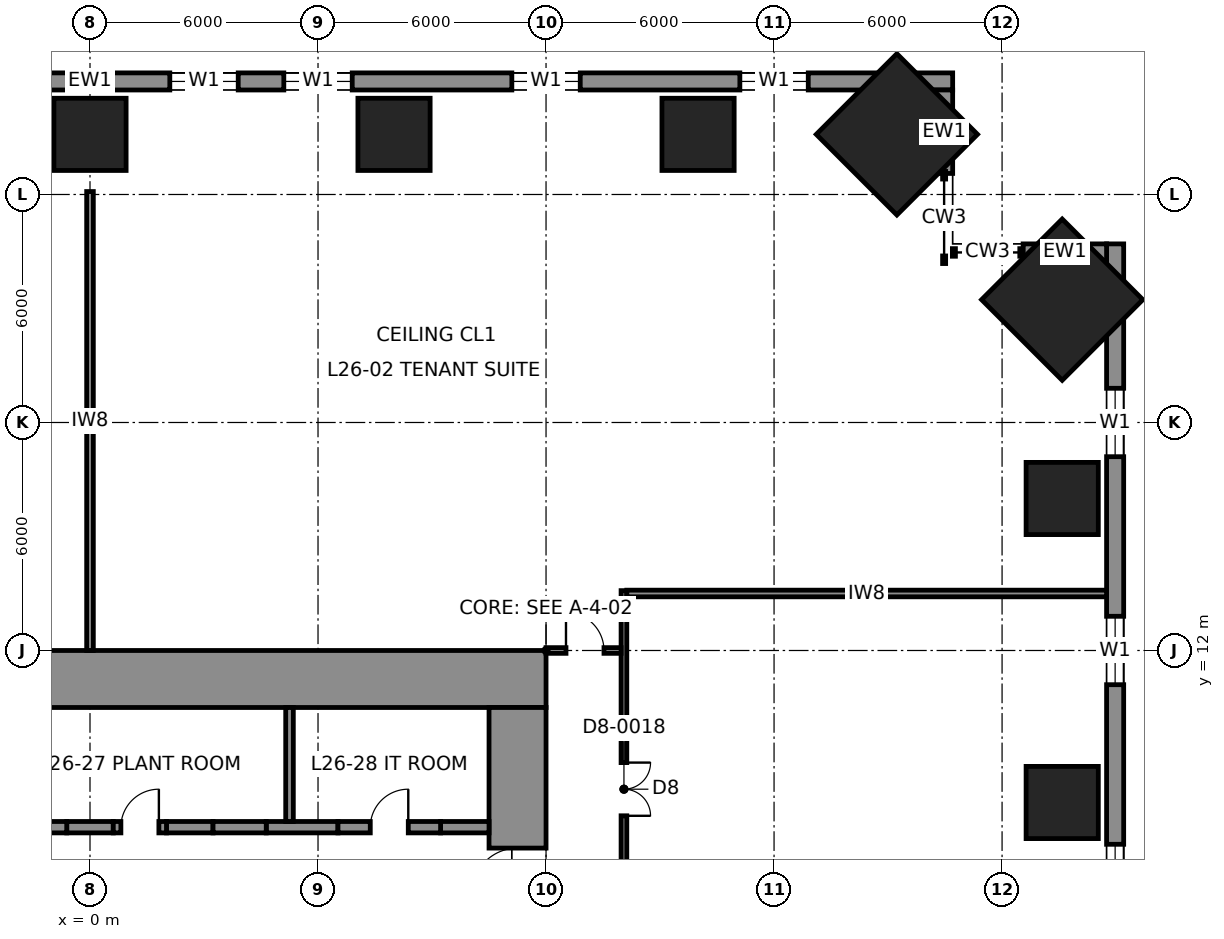
"""IFC4 building model, lengths in metres.
Left out: names, types, materials, properties, quantities, classifications, styles, units other than length and angle.
Written with IfcOpenShell. Run it as: python <this file> out.ifc"""

import sys

from ifc_helpers import new_model, si_unit, direction, frame, frame_2d, origin, origin_2d, place, context, subcontext, project, spatial, rectangle, extrude, element, fill, save


model = new_model("IFC4")
c1 = context("Model", 3, precision=1e-05, world=origin(), true_north=direction((0.0, 1.0)))
c2 = subcontext(c1, "Body", "Model", "MODEL_VIEW")
j1 = project(units=[si_unit("LENGTHUNIT", "METRE"), si_unit("PLANEANGLEUNIT", "RADIAN")], contexts=[c1])
p1 = place(None, origin())
s1 = spatial("IfcSite", under=j1, at=p1, CompositionType="ELEMENT")
p2 = place(p1, origin())
s2 = spatial("IfcBuilding", under=s1, at=p2, CompositionType="ELEMENT")
p3 = place(p2, frame((0.0, 0.0, 131.8)))
s3 = spatial("IfcBuildingStorey", under=s2, at=p3, CompositionType="ELEMENT", Elevation=131.8)
for number, where, z_axis, x_axis in (
    (1, (21.232, 25.582, 0.0), (-0.04, -0.04, 0.998), (0.708, -0.707, 0.0)),
    (2, (25.582, 21.232, 0.0), (-0.04, -0.04, 0.998), (0.707, -0.708, 0.0)),
):
    element("IfcColumn", number, at=place(p3, frame(where, z_axis=z_axis, x_axis=x_axis)), inside=s3, PredefinedType="COLUMN", context=c2, shape_type="SweptSolid", body=[
        extrude(rectangle(XDim=3.0, YDim=3.0, at=origin_2d()), origin(), (0.0, 0.0, 1.0), 4.007),
    ])
for number, where, z_axis, x_axis in (
    (3, (0.0, 25.582, 0.0), (0.0, -0.04, 0.999), (1.0, 0.0, 0.0)),
    (4, (8.0, 25.582, 0.0), (0.0, -0.04, 0.999), (1.0, 0.0, 0.0)),
    (5, (16.0, 25.582, 0.0), (0.0, -0.04, 0.999), (1.0, 0.0, 0.0)),
    (6, (25.582, 8.0, 0.0), (-0.04, 0.0, 0.999), (0.0, -1.0, 0.0)),
    (7, (25.582, 16.0, 0.0), (-0.04, 0.0, 0.999), (0.0, -1.0, 0.0)),
):
    element("IfcColumn", number, at=place(p3, frame(where, z_axis=z_axis, x_axis=x_axis)), inside=s3, PredefinedType="COLUMN", context=c2, shape_type="SweptSolid", body=[
        extrude(rectangle(XDim=1.9, YDim=1.9, at=origin_2d()), origin(), (0.0, 0.0, 1.0), 4.003),
    ])
p4 = place(p3, frame((-12.0, 11.25, 0.0), z_axis=(0.0, 0.0, 1.0), x_axis=(1.0, 0.0, 0.0)))
e8 = element("IfcWall", 8, at=p4, inside=s3, PredefinedType="SHEAR", context=c2, shape_type="SweptSolid", body=[
    extrude(rectangle(XDim=24.0, YDim=1.5, at=frame_2d((12.0, 0.0))), origin(), (0.0, 0.0, 1.0), 4.0),
])
p5 = place(p3, frame((11.25, 10.5, 0.0), z_axis=(0.0, 0.0, 1.0), x_axis=(0.0, -1.0, 0.0)))
e9 = element("IfcWall", 9, at=p5, inside=s3, PredefinedType="SHEAR", context=c2, shape_type="SweptSolid", body=[
    extrude(rectangle(XDim=21.0, YDim=1.5, at=frame_2d((10.5, 0.0))), origin(), (0.0, 0.0, 1.0), 4.0),
])
p6 = place(p5, frame((3.7, 0.0, 0.0)))
e10 = element("IfcOpeningElement", 10, at=p6, cuts=e9, PredefinedType="OPENING", context=c2, shape_type="SweptSolid", body=[
    extrude(rectangle(XDim=1.2, YDim=2.3, at=frame_2d((0.6, 1.15))), frame((0.0, 0.76, 0.0), z_axis=(0.0, -1.0, 0.0), x_axis=(1.0, 0.0, 0.0)), (0.0, 0.0, 1.0), 1.52),
])
p7 = place(p5, frame((16.1, 0.0, 0.0)))
e11 = element("IfcOpeningElement", 11, at=p7, cuts=e9, PredefinedType="OPENING", context=c2, shape_type="SweptSolid", body=[
    extrude(rectangle(XDim=1.2, YDim=2.3, at=frame_2d((0.6, 1.15))), frame((0.0, 0.76, 0.0), z_axis=(0.0, -1.0, 0.0), x_axis=(1.0, 0.0, 0.0)), (0.0, 0.0, 1.0), 1.52),
])
for number, where, z_axis, x_axis in (
    (12, (-0.613, 7.35, 0.0), (0.0, 0.0, 1.0), (1.0, 0.0, 0.0)),
    (13, (2.012, 7.35, 0.0), (0.0, 0.0, 1.0), (1.0, 0.0, 0.0)),
):
    element("IfcWall", number, at=place(p3, frame(where, z_axis=z_axis, x_axis=x_axis)), inside=s3, PredefinedType="SHEAR", context=c2, shape_type="SweptSolid", body=[
        extrude(rectangle(XDim=1.225, YDim=0.3, at=frame_2d((0.613, 0.0))), origin(), (0.0, 0.0, 1.0), 4.0),
    ])
p8 = place(p3, frame((4.637, 7.35, 0.0), z_axis=(0.0, 0.0, 1.0), x_axis=(1.0, 0.0, 0.0)))
e14 = element("IfcWall", 14, at=p8, inside=s3, PredefinedType="SHEAR", context=c2, shape_type="SweptSolid", body=[
    extrude(rectangle(XDim=1.887, YDim=0.3, at=frame_2d((0.944, 0.0))), origin(), (0.0, 0.0, 1.0), 4.0),
])
p9 = place(p3, frame((9.225, 7.35, 0.0), z_axis=(0.0, 0.0, 1.0), x_axis=(1.0, 0.0, 0.0)))
e15 = element("IfcWall", 15, at=p9, inside=s3, PredefinedType="SHEAR", context=c2, shape_type="SweptSolid", body=[
    extrude(rectangle(XDim=1.275, YDim=0.3, at=frame_2d((0.637, 0.0))), origin(), (0.0, 0.0, 1.0), 4.0),
])
p10 = place(p3, frame((-2.012, 7.35, 0.0), z_axis=(0.0, 0.0, 1.0), x_axis=(1.0, 0.0, 0.0)))
e16 = element("IfcWall", 16, at=p10, inside=s3, PredefinedType="PARTITIONING", context=c2, shape_type="SweptSolid", body=[
    extrude(rectangle(XDim=1.4, YDim=0.3, at=frame_2d((0.7, 0.0))), origin(), (0.0, 0.0, 1.0), 4.0),
])
p11 = place(p3, frame((0.613, 7.35, 0.0), z_axis=(0.0, 0.0, 1.0), x_axis=(1.0, 0.0, 0.0)))
e17 = element("IfcWall", 17, at=p11, inside=s3, PredefinedType="PARTITIONING", context=c2, shape_type="SweptSolid", body=[
    extrude(rectangle(XDim=1.4, YDim=0.3, at=frame_2d((0.7, 0.0))), origin(), (0.0, 0.0, 1.0), 4.0),
])
p12 = place(p11, frame((0.2, 0.0, 0.0)))
e18 = element("IfcOpeningElement", 18, at=p12, cuts=e17, PredefinedType="OPENING", context=c2, shape_type="SweptSolid", body=[
    extrude(rectangle(XDim=1.0, YDim=2.3, at=frame_2d((0.5, 1.15))), frame((0.0, 0.16, 0.0), z_axis=(0.0, -1.0, 0.0), x_axis=(1.0, 0.0, 0.0)), (0.0, 0.0, 1.0), 0.32),
])
p13 = place(p3, frame((3.238, 7.35, 0.0), z_axis=(0.0, 0.0, 1.0), x_axis=(1.0, 0.0, 0.0)))
e19 = element("IfcWall", 19, at=p13, inside=s3, PredefinedType="PARTITIONING", context=c2, shape_type="SweptSolid", body=[
    extrude(rectangle(XDim=1.4, YDim=0.3, at=frame_2d((0.7, 0.0))), origin(), (0.0, 0.0, 1.0), 4.0),
])
p14 = place(p3, frame((6.525, 7.35, 0.0), z_axis=(0.0, 0.0, 1.0), x_axis=(1.0, 0.0, 0.0)))
e20 = element("IfcWall", 20, at=p14, inside=s3, PredefinedType="PARTITIONING", context=c2, shape_type="SweptSolid", body=[
    extrude(rectangle(XDim=2.7, YDim=0.3, at=frame_2d((1.35, 0.0))), origin(), (0.0, 0.0, 1.0), 4.0),
])
p15 = place(p14, frame((0.85, 0.0, 0.0)))
e21 = element("IfcOpeningElement", 21, at=p15, cuts=e20, PredefinedType="OPENING", context=c2, shape_type="SweptSolid", body=[
    extrude(rectangle(XDim=1.0, YDim=2.3, at=frame_2d((0.5, 1.15))), frame((0.0, 0.16, 0.0), z_axis=(0.0, -1.0, 0.0), x_axis=(1.0, 0.0, 0.0)), (0.0, 0.0, 1.0), 0.32),
])
p16 = place(p3, frame((5.25, 7.5, 0.0), z_axis=(0.0, 0.0, 1.0), x_axis=(0.0, 1.0, 0.0)))
e22 = element("IfcWall", 22, at=p16, inside=s3, PredefinedType="PARTITIONING", context=c2, shape_type="SweptSolid", body=[
    extrude(rectangle(XDim=3.0, YDim=0.2, at=frame_2d((1.5, 0.0))), origin(), (0.0, 0.0, 1.0), 4.0),
])
p17 = place(p3, frame((22.7, 26.975, 0.0), z_axis=(0.0, 0.0, 1.0), x_axis=(-1.0, 0.0, 0.0)))
e23 = element("IfcWall", 23, at=p17, inside=s3, PredefinedType="SOLIDWALL", context=c2, shape_type="SweptSolid", body=[
    extrude(rectangle(XDim=45.4, YDim=0.45, at=frame_2d((22.7, 0.0))), origin(), (0.0, 0.0, 1.0), 3.83),
])
p18 = place(p17, frame((3.8, 0.0, 0.7)))
e24 = element("IfcOpeningElement", 24, at=p18, cuts=e23, PredefinedType="OPENING", context=c2, shape_type="SweptSolid", body=[
    extrude(rectangle(XDim=1.8, YDim=2.6, at=frame_2d((0.9, 1.3))), frame((0.0, 0.235, 0.0), z_axis=(0.0, -1.0, 0.0), x_axis=(1.0, 0.0, 0.0)), (0.0, 0.0, 1.0), 0.47),
])
p19 = place(p17, frame((9.8, 0.0, 0.7)))
e25 = element("IfcOpeningElement", 25, at=p19, cuts=e23, PredefinedType="OPENING", context=c2, shape_type="SweptSolid", body=[
    extrude(rectangle(XDim=1.8, YDim=2.6, at=frame_2d((0.9, 1.3))), frame((0.0, 0.235, 0.0), z_axis=(0.0, -1.0, 0.0), x_axis=(1.0, 0.0, 0.0)), (0.0, 0.0, 1.0), 0.47),
])
p20 = place(p17, frame((15.8, 0.0, 0.7)))
e26 = element("IfcOpeningElement", 26, at=p20, cuts=e23, PredefinedType="OPENING", context=c2, shape_type="SweptSolid", body=[
    extrude(rectangle(XDim=1.8, YDim=2.6, at=frame_2d((0.9, 1.3))), frame((0.0, 0.235, 0.0), z_axis=(0.0, -1.0, 0.0), x_axis=(1.0, 0.0, 0.0)), (0.0, 0.0, 1.0), 0.47),
])
p21 = place(p17, frame((18.8, 0.0, 0.7)))
e27 = element("IfcOpeningElement", 27, at=p21, cuts=e23, PredefinedType="OPENING", context=c2, shape_type="SweptSolid", body=[
    extrude(rectangle(XDim=1.8, YDim=2.6, at=frame_2d((0.9, 1.3))), frame((0.0, 0.235, 0.0), z_axis=(0.0, -1.0, 0.0), x_axis=(1.0, 0.0, 0.0)), (0.0, 0.0, 1.0), 0.47),
])
p22 = place(p17, frame((24.8, 0.0, 0.7)))
e28 = element("IfcOpeningElement", 28, at=p22, cuts=e23, PredefinedType="OPENING", context=c2, shape_type="SweptSolid", body=[
    extrude(rectangle(XDim=1.8, YDim=2.6, at=frame_2d((0.9, 1.3))), frame((0.0, 0.235, 0.0), z_axis=(0.0, -1.0, 0.0), x_axis=(1.0, 0.0, 0.0)), (0.0, 0.0, 1.0), 0.47),
])
p23 = place(p17, frame((27.8, 0.0, 0.7)))
e29 = element("IfcOpeningElement", 29, at=p23, cuts=e23, PredefinedType="OPENING", context=c2, shape_type="SweptSolid", body=[
    extrude(rectangle(XDim=1.8, YDim=2.6, at=frame_2d((0.9, 1.3))), frame((0.0, 0.235, 0.0), z_axis=(0.0, -1.0, 0.0), x_axis=(1.0, 0.0, 0.0)), (0.0, 0.0, 1.0), 0.47),
])
p24 = place(p17, frame((33.8, 0.0, 0.7)))
e30 = element("IfcOpeningElement", 30, at=p24, cuts=e23, PredefinedType="OPENING", context=c2, shape_type="SweptSolid", body=[
    extrude(rectangle(XDim=1.8, YDim=2.6, at=frame_2d((0.9, 1.3))), frame((0.0, 0.235, 0.0), z_axis=(0.0, -1.0, 0.0), x_axis=(1.0, 0.0, 0.0)), (0.0, 0.0, 1.0), 0.47),
])
p25 = place(p17, frame((39.8, 0.0, 0.7)))
e31 = element("IfcOpeningElement", 31, at=p25, cuts=e23, PredefinedType="OPENING", context=c2, shape_type="SweptSolid", body=[
    extrude(rectangle(XDim=1.8, YDim=2.6, at=frame_2d((0.9, 1.3))), frame((0.0, 0.235, 0.0), z_axis=(0.0, -1.0, 0.0), x_axis=(1.0, 0.0, 0.0)), (0.0, 0.0, 1.0), 0.47),
])
p26 = place(p3, frame((26.975, -22.7, 0.0), z_axis=(0.0, 0.0, 1.0), x_axis=(0.0, 1.0, 0.0)))
e32 = element("IfcWall", 32, at=p26, inside=s3, PredefinedType="SOLIDWALL", context=c2, shape_type="SweptSolid", body=[
    extrude(rectangle(XDim=45.4, YDim=0.45, at=frame_2d((22.7, 0.0))), origin(), (0.0, 0.0, 1.0), 3.83),
])
p27 = place(p26, frame((3.8, 0.0, 0.7)))
e33 = element("IfcOpeningElement", 33, at=p27, cuts=e32, PredefinedType="OPENING", context=c2, shape_type="SweptSolid", body=[
    extrude(rectangle(XDim=1.8, YDim=2.6, at=frame_2d((0.9, 1.3))), frame((0.0, 0.235, 0.0), z_axis=(0.0, -1.0, 0.0), x_axis=(1.0, 0.0, 0.0)), (0.0, 0.0, 1.0), 0.47),
])
p28 = place(p26, frame((9.8, 0.0, 0.7)))
e34 = element("IfcOpeningElement", 34, at=p28, cuts=e32, PredefinedType="OPENING", context=c2, shape_type="SweptSolid", body=[
    extrude(rectangle(XDim=1.8, YDim=2.6, at=frame_2d((0.9, 1.3))), frame((0.0, 0.235, 0.0), z_axis=(0.0, -1.0, 0.0), x_axis=(1.0, 0.0, 0.0)), (0.0, 0.0, 1.0), 0.47),
])
p29 = place(p26, frame((15.8, 0.0, 0.7)))
e35 = element("IfcOpeningElement", 35, at=p29, cuts=e32, PredefinedType="OPENING", context=c2, shape_type="SweptSolid", body=[
    extrude(rectangle(XDim=1.8, YDim=2.6, at=frame_2d((0.9, 1.3))), frame((0.0, 0.235, 0.0), z_axis=(0.0, -1.0, 0.0), x_axis=(1.0, 0.0, 0.0)), (0.0, 0.0, 1.0), 0.47),
])
p30 = place(p26, frame((18.8, 0.0, 0.7)))
e36 = element("IfcOpeningElement", 36, at=p30, cuts=e32, PredefinedType="OPENING", context=c2, shape_type="SweptSolid", body=[
    extrude(rectangle(XDim=1.8, YDim=2.6, at=frame_2d((0.9, 1.3))), frame((0.0, 0.235, 0.0), z_axis=(0.0, -1.0, 0.0), x_axis=(1.0, 0.0, 0.0)), (0.0, 0.0, 1.0), 0.47),
])
p31 = place(p26, frame((24.8, 0.0, 0.7)))
e37 = element("IfcOpeningElement", 37, at=p31, cuts=e32, PredefinedType="OPENING", context=c2, shape_type="SweptSolid", body=[
    extrude(rectangle(XDim=1.8, YDim=2.6, at=frame_2d((0.9, 1.3))), frame((0.0, 0.235, 0.0), z_axis=(0.0, -1.0, 0.0), x_axis=(1.0, 0.0, 0.0)), (0.0, 0.0, 1.0), 0.47),
])
p32 = place(p26, frame((27.8, 0.0, 0.7)))
e38 = element("IfcOpeningElement", 38, at=p32, cuts=e32, PredefinedType="OPENING", context=c2, shape_type="SweptSolid", body=[
    extrude(rectangle(XDim=1.8, YDim=2.6, at=frame_2d((0.9, 1.3))), frame((0.0, 0.235, 0.0), z_axis=(0.0, -1.0, 0.0), x_axis=(1.0, 0.0, 0.0)), (0.0, 0.0, 1.0), 0.47),
])
p33 = place(p26, frame((33.8, 0.0, 0.7)))
e39 = element("IfcOpeningElement", 39, at=p33, cuts=e32, PredefinedType="OPENING", context=c2, shape_type="SweptSolid", body=[
    extrude(rectangle(XDim=1.8, YDim=2.6, at=frame_2d((0.9, 1.3))), frame((0.0, 0.235, 0.0), z_axis=(0.0, -1.0, 0.0), x_axis=(1.0, 0.0, 0.0)), (0.0, 0.0, 1.0), 0.47),
])
p34 = place(p26, frame((39.8, 0.0, 0.7)))
e40 = element("IfcOpeningElement", 40, at=p34, cuts=e32, PredefinedType="OPENING", context=c2, shape_type="SweptSolid", body=[
    extrude(rectangle(XDim=1.8, YDim=2.6, at=frame_2d((0.9, 1.3))), frame((0.0, 0.235, 0.0), z_axis=(0.0, -1.0, 0.0), x_axis=(1.0, 0.0, 0.0)), (0.0, 0.0, 1.0), 0.47),
])
for number, where, z_axis, x_axis in (
    (41, (22.475, 24.554, 0.0), (0.0, 0.0, 1.0), (0.0, 1.0, 0.0)),
    (42, (24.554, 22.475, 0.0), (0.0, 0.0, 1.0), (1.0, 0.0, 0.0)),
):
    element("IfcWall", number, at=place(p3, frame(where, z_axis=z_axis, x_axis=x_axis)), inside=s3, PredefinedType="SOLIDWALL", context=c2, shape_type="SweptSolid", body=[
        extrude(rectangle(XDim=2.196, YDim=0.45, at=frame_2d((1.098, 0.0))), origin(), (0.0, 0.0, 1.0), 3.83),
    ])
p35 = place(p3, frame((14.05, -13.975, 0.0), z_axis=(0.0, 0.0, 1.0), x_axis=(0.0, 1.0, 0.0)))
e43 = element("IfcWall", 43, at=p35, inside=s3, PredefinedType="PARTITIONING", context=c2, shape_type="SweptSolid", body=[
    extrude(rectangle(XDim=27.55, YDim=0.15, at=frame_2d((13.775, 0.0))), origin(), (0.0, 0.0, 1.0), 3.83),
])
p36 = place(p35, frame((7.675, 0.0, 0.0)))
e44 = element("IfcOpeningElement", 44, at=p36, cuts=e43, PredefinedType="OPENING", context=c2, shape_type="SweptSolid", body=[
    extrude(rectangle(XDim=1.4, YDim=2.3, at=frame_2d((0.7, 1.15))), frame((0.0, 0.085, 0.0), z_axis=(0.0, -1.0, 0.0), x_axis=(1.0, 0.0, 0.0)), (0.0, 0.0, 1.0), 0.17),
])
p37 = place(p35, frame((21.625, 0.0, 0.0)))
e45 = element("IfcOpeningElement", 45, at=p37, cuts=e43, PredefinedType="OPENING", context=c2, shape_type="SweptSolid", body=[
    extrude(rectangle(XDim=1.4, YDim=2.3, at=frame_2d((0.7, 1.15))), frame((0.0, 0.085, 0.0), z_axis=(0.0, -1.0, 0.0), x_axis=(1.0, 0.0, 0.0)), (0.0, 0.0, 1.0), 0.17),
])
p38 = place(p35, frame((16.975, 0.0, 0.0)))
e46 = element("IfcOpeningElement", 46, at=p38, cuts=e43, PredefinedType="OPENING", context=c2, shape_type="SweptSolid", body=[
    extrude(rectangle(XDim=1.0, YDim=2.3, at=frame_2d((0.5, 1.15))), frame((0.0, 0.085, 0.0), z_axis=(0.0, -1.0, 0.0), x_axis=(1.0, 0.0, 0.0)), (0.0, 0.0, 1.0), 0.17),
])
p39 = place(p3, frame((12.0, 12.0, 0.0), z_axis=(0.0, 0.0, 1.0), x_axis=(1.0, 0.0, 0.0)))
e47 = element("IfcWall", 47, at=p39, inside=s3, PredefinedType="PARTITIONING", context=c2, shape_type="SweptSolid", body=[
    extrude(rectangle(XDim=1.975, YDim=0.15, at=frame_2d((0.988, 0.0))), origin(), (0.0, 0.0, 1.0), 3.83),
])
p40 = place(p39, frame((0.525, 0.0, 0.0)))
e48 = element("IfcOpeningElement", 48, at=p40, cuts=e47, PredefinedType="OPENING", context=c2, shape_type="SweptSolid", body=[
    extrude(rectangle(XDim=1.0, YDim=2.3, at=frame_2d((0.5, 1.15))), frame((0.0, 0.085, 0.0), z_axis=(0.0, -1.0, 0.0), x_axis=(1.0, 0.0, 0.0)), (0.0, 0.0, 1.0), 0.17),
])
p41 = place(p3, frame((14.125, 13.5, 0.0), z_axis=(0.0, 0.0, 1.0), x_axis=(1.0, 0.0, 0.0)))
e49 = element("IfcWall", 49, at=p41, inside=s3, PredefinedType="PARTITIONING", context=c2, shape_type="SweptSolid", body=[
    extrude(rectangle(XDim=12.625, YDim=0.175, at=frame_2d((6.312, 0.0))), origin(), (0.0, 0.0, 1.0), 3.83),
])
p42 = place(p3, frame((0.0, 12.0, 0.0), z_axis=(0.0, 0.0, 1.0), x_axis=(0.0, 1.0, 0.0)))
e50 = element("IfcWall", 50, at=p42, inside=s3, PredefinedType="PARTITIONING", context=c2, shape_type="SweptSolid", body=[
    extrude(rectangle(XDim=12.077, YDim=0.175, at=frame_2d((6.039, 0.0))), origin(), (0.0, 0.0, 1.0), 2.83),
])
p43 = place(p18, origin())
e51 = element("IfcWindow", 51, at=p43, inside=s3, PartitioningType="SINGLE_PANEL", PredefinedType="WINDOW", context=c2, shape_type="SweptSolid", body=[
    extrude(rectangle(XDim=1.8, YDim=2.6, at=frame_2d((0.9, 1.3))), frame((0.0, 0.03, 0.0), z_axis=(0.0, -1.0, 0.0), x_axis=(1.0, 0.0, 0.0)), (0.0, 0.0, 1.0), 0.06),
])
fill(e24, e51)
p44 = place(p19, origin())
e52 = element("IfcWindow", 52, at=p44, inside=s3, PartitioningType="SINGLE_PANEL", PredefinedType="WINDOW", context=c2, shape_type="SweptSolid", body=[
    extrude(rectangle(XDim=1.8, YDim=2.6, at=frame_2d((0.9, 1.3))), frame((0.0, 0.03, 0.0), z_axis=(0.0, -1.0, 0.0), x_axis=(1.0, 0.0, 0.0)), (0.0, 0.0, 1.0), 0.06),
])
fill(e25, e52)
p45 = place(p20, origin())
e53 = element("IfcWindow", 53, at=p45, inside=s3, PartitioningType="SINGLE_PANEL", PredefinedType="WINDOW", context=c2, shape_type="SweptSolid", body=[
    extrude(rectangle(XDim=1.8, YDim=2.6, at=frame_2d((0.9, 1.3))), frame((0.0, 0.03, 0.0), z_axis=(0.0, -1.0, 0.0), x_axis=(1.0, 0.0, 0.0)), (0.0, 0.0, 1.0), 0.06),
])
fill(e26, e53)
p46 = place(p21, origin())
e54 = element("IfcWindow", 54, at=p46, inside=s3, PartitioningType="SINGLE_PANEL", PredefinedType="WINDOW", context=c2, shape_type="SweptSolid", body=[
    extrude(rectangle(XDim=1.8, YDim=2.6, at=frame_2d((0.9, 1.3))), frame((0.0, 0.03, 0.0), z_axis=(0.0, -1.0, 0.0), x_axis=(1.0, 0.0, 0.0)), (0.0, 0.0, 1.0), 0.06),
])
fill(e27, e54)
p47 = place(p32, origin())
e55 = element("IfcWindow", 55, at=p47, inside=s3, PartitioningType="SINGLE_PANEL", PredefinedType="WINDOW", context=c2, shape_type="SweptSolid", body=[
    extrude(rectangle(XDim=1.8, YDim=2.6, at=frame_2d((0.9, 1.3))), frame((0.0, 0.03, 0.0), z_axis=(0.0, -1.0, 0.0), x_axis=(1.0, 0.0, 0.0)), (0.0, 0.0, 1.0), 0.06),
])
fill(e38, e55)
p48 = place(p33, origin())
e56 = element("IfcWindow", 56, at=p48, inside=s3, PartitioningType="SINGLE_PANEL", PredefinedType="WINDOW", context=c2, shape_type="SweptSolid", body=[
    extrude(rectangle(XDim=1.8, YDim=2.6, at=frame_2d((0.9, 1.3))), frame((0.0, 0.03, 0.0), z_axis=(0.0, -1.0, 0.0), x_axis=(1.0, 0.0, 0.0)), (0.0, 0.0, 1.0), 0.06),
])
fill(e39, e56)
p49 = place(p34, origin())
e57 = element("IfcWindow", 57, at=p49, inside=s3, PartitioningType="SINGLE_PANEL", PredefinedType="WINDOW", context=c2, shape_type="SweptSolid", body=[
    extrude(rectangle(XDim=1.8, YDim=2.6, at=frame_2d((0.9, 1.3))), frame((0.0, 0.03, 0.0), z_axis=(0.0, -1.0, 0.0), x_axis=(1.0, 0.0, 0.0)), (0.0, 0.0, 1.0), 0.06),
])
fill(e40, e57)
p50 = place(p40, origin())
e58 = element("IfcDoor", 58, at=p50, inside=s3, OperationType="SINGLE_SWING_LEFT", PredefinedType="DOOR", context=c2, shape_type="SweptSolid", body=[
    extrude(rectangle(XDim=1.0, YDim=2.3, at=frame_2d((0.5, 1.15))), frame((0.0, 0.025, 0.0), z_axis=(0.0, -1.0, 0.0), x_axis=(1.0, 0.0, 0.0)), (0.0, 0.0, 1.0), 0.05),
])
fill(e48, e58)
p51 = place(p37, frame((1.4, 0.0, 0.0), z_axis=(0.0, 0.0, 1.0), x_axis=(-1.0, 0.0, 0.0)))
e59 = element("IfcDoor", 59, at=p51, inside=s3, OperationType="DOUBLE_DOOR_SINGLE_SWING", PredefinedType="DOOR", context=c2, shape_type="SweptSolid", body=[
    extrude(rectangle(XDim=1.4, YDim=2.3, at=frame_2d((0.7, 1.15))), frame((0.0, 0.025, 0.0), z_axis=(0.0, -1.0, 0.0), x_axis=(1.0, 0.0, 0.0)), (0.0, 0.0, 1.0), 0.05),
])
fill(e45, e59)
p52 = place(p12, origin())
e60 = element("IfcDoor", 60, at=p52, inside=s3, OperationType="SINGLE_SWING_RIGHT", PredefinedType="DOOR", context=c2, shape_type="SweptSolid", body=[
    extrude(rectangle(XDim=1.0, YDim=2.3, at=frame_2d((0.5, 1.15))), frame((0.0, 0.025, 0.0), z_axis=(0.0, -1.0, 0.0), x_axis=(1.0, 0.0, 0.0)), (0.0, 0.0, 1.0), 0.05),
])
fill(e18, e60)
p53 = place(p15, origin())
e61 = element("IfcDoor", 61, at=p53, inside=s3, OperationType="SINGLE_SWING_RIGHT", PredefinedType="DOOR", context=c2, shape_type="SweptSolid", body=[
    extrude(rectangle(XDim=1.0, YDim=2.3, at=frame_2d((0.5, 1.15))), frame((0.0, 0.025, 0.0), z_axis=(0.0, -1.0, 0.0), x_axis=(1.0, 0.0, 0.0)), (0.0, 0.0, 1.0), 0.05),
])
fill(e21, e61)
p54 = place(p6, frame((1.2, 0.0, 0.0), z_axis=(0.0, 0.0, 1.0), x_axis=(-1.0, 0.0, 0.0)))
e62 = element("IfcDoor", 62, at=p54, inside=s3, OperationType="SINGLE_SWING_LEFT", PredefinedType="DOOR", context=c2, shape_type="SweptSolid", body=[
    extrude(rectangle(XDim=1.2, YDim=2.3, at=frame_2d((0.6, 1.15))), frame((0.0, 0.025, 0.0), z_axis=(0.0, -1.0, 0.0), x_axis=(1.0, 0.0, 0.0)), (0.0, 0.0, 1.0), 0.05),
])
fill(e10, e62)
save(model, sys.argv[1])
